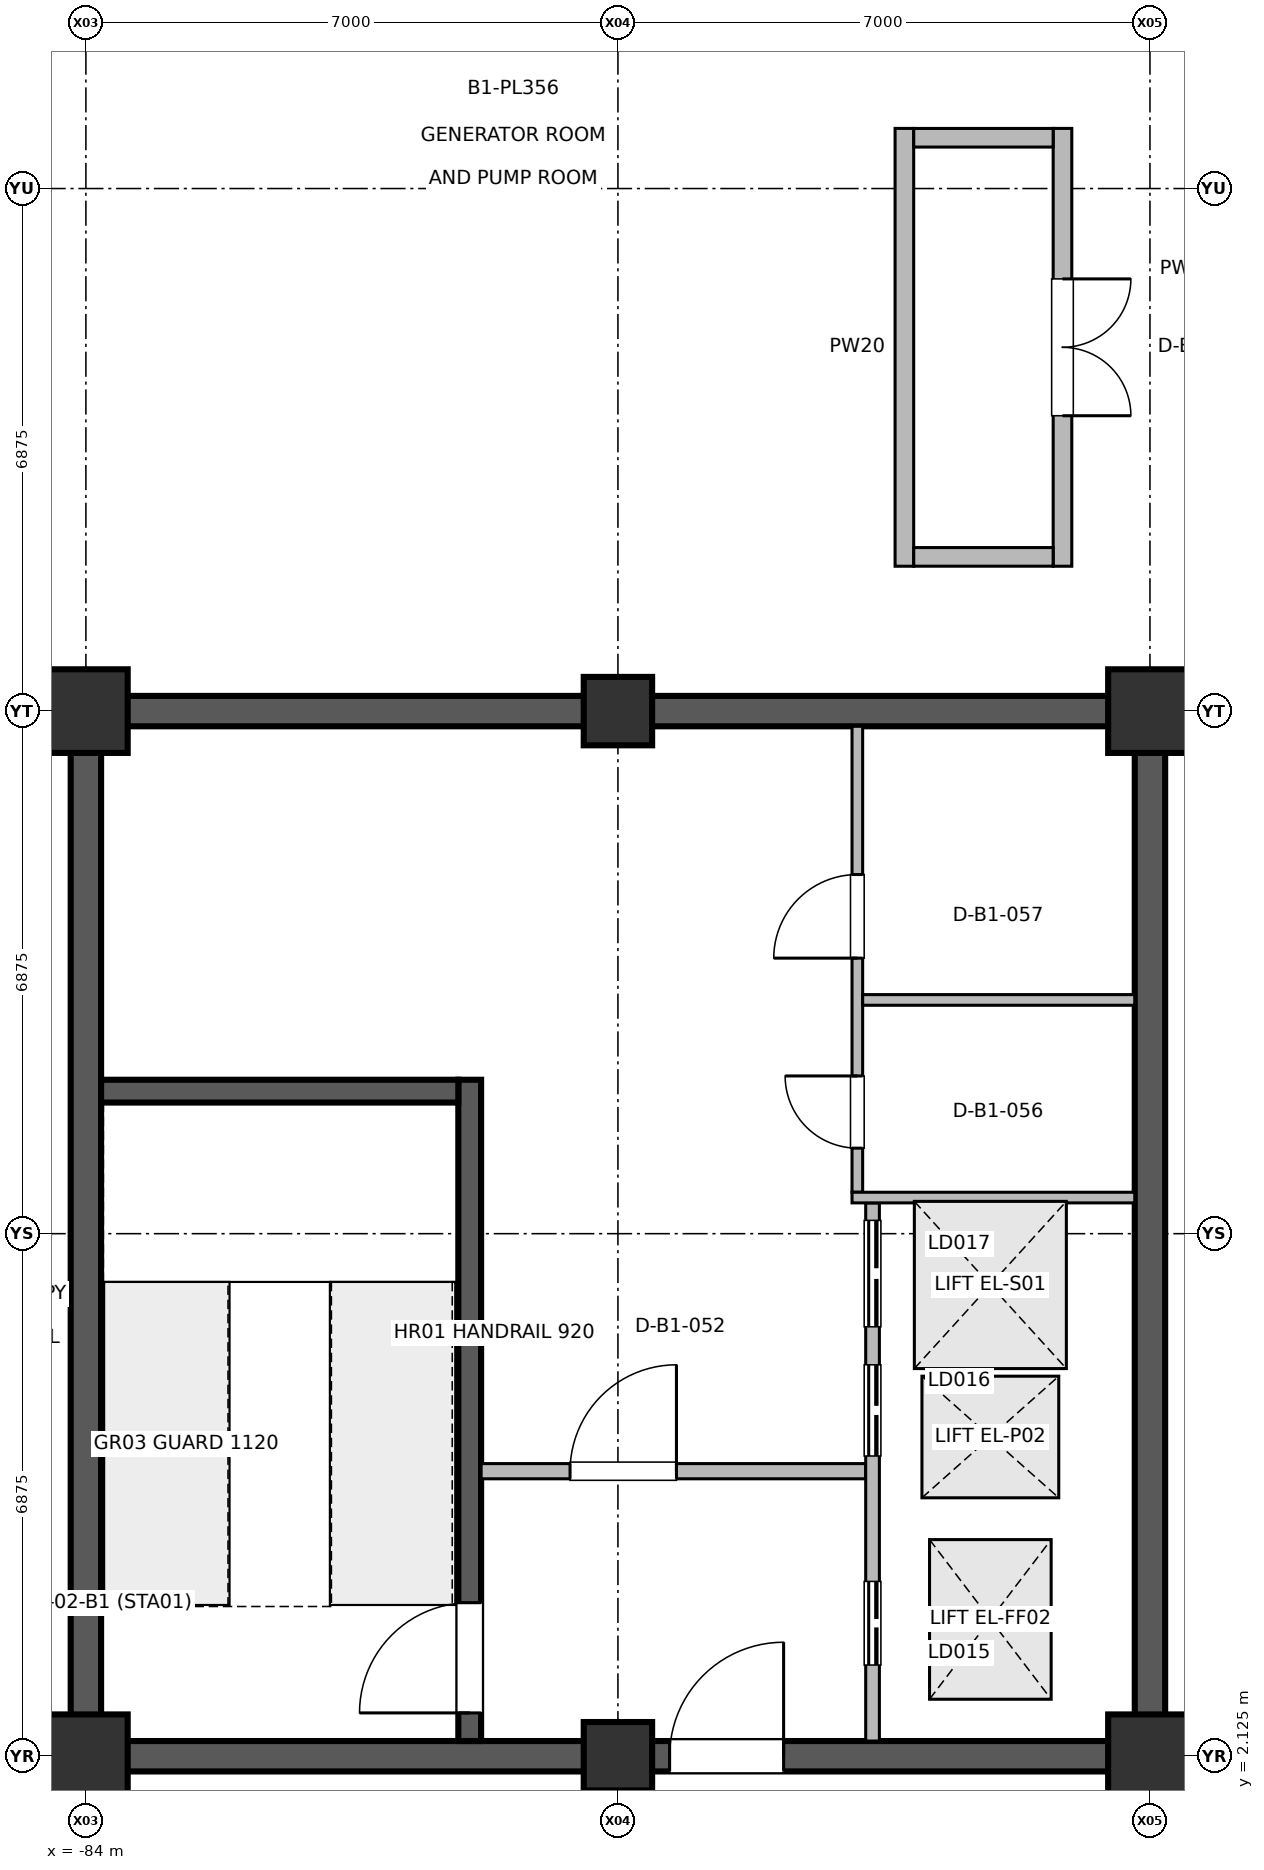
"""IFC4 building model, lengths in metres.
Left out: names, types, materials, properties, quantities, classifications, styles, units other than length and angle.
Written with IfcOpenShell. Run it as: python <this file> out.ifc"""

import sys

from ifc_helpers import new_model, si_unit, direction, frame, frame_2d, origin, origin_2d, place, context, subcontext, project, spatial, rectangle, extrude, element, fill, save


model = new_model("IFC4")
c1 = context("Model", 3, precision=1e-05, world=origin(), true_north=direction((0.0, 1.0)))
c2 = subcontext(c1, "Body", "Model", "MODEL_VIEW")
j1 = project(units=[si_unit("LENGTHUNIT", "METRE"), si_unit("PLANEANGLEUNIT", "RADIAN")], contexts=[c1])
p1 = place(None, origin())
s1 = spatial("IfcSite", under=j1, at=p1, CompositionType="ELEMENT")
p2 = place(p1, origin())
s2 = spatial("IfcBuilding", under=s1, at=p2, CompositionType="ELEMENT")
p3 = place(p2, frame((0.0, 0.0, -6.0)))
s3 = spatial("IfcBuildingStorey", under=s2, at=p3, CompositionType="ELEMENT", Elevation=-6.0)
for number, where, z_axis, x_axis in (
    (1, (-84.0, 2.125, 0.0), (0.0, 0.0, 1.0), (1.0, 0.0, 0.0)),
    (2, (-84.0, 15.875, 0.0), (0.0, 0.0, 1.0), (1.0, 0.0, 0.0)),
):
    element("IfcColumn", number, at=place(p3, frame(where, z_axis=z_axis, x_axis=x_axis)), inside=s3, PredefinedType="COLUMN", context=c2, shape_type="SweptSolid", body=[
        extrude(rectangle(XDim=1.1, YDim=1.1, at=origin_2d()), origin(), (0.0, 0.0, 1.0), 5.998),
    ])
for number, where, z_axis, x_axis in (
    (3, (-77.0, 2.125, 0.0), (0.0, 0.0, 1.0), (1.0, 0.0, 0.0)),
    (4, (-77.0, 15.875, 0.0), (0.0, 0.0, 1.0), (1.0, 0.0, 0.0)),
):
    element("IfcColumn", number, at=place(p3, frame(where, z_axis=z_axis, x_axis=x_axis)), inside=s3, PredefinedType="COLUMN", context=c2, shape_type="SweptSolid", body=[
        extrude(rectangle(XDim=0.9, YDim=0.9, at=origin_2d()), origin(), (0.0, 0.0, 1.0), 5.998),
    ])
for number, where, z_axis, x_axis in (
    (5, (-70.0, 2.125, 0.0), (0.0, 0.0, 1.0), (1.0, 0.0, 0.0)),
    (6, (-70.0, 15.875, 0.0), (0.0, 0.0, 1.0), (1.0, 0.0, 0.0)),
):
    element("IfcColumn", number, at=place(p3, frame(where, z_axis=z_axis, x_axis=x_axis)), inside=s3, PredefinedType="COLUMN", context=c2, shape_type="SweptSolid", body=[
        extrude(rectangle(XDim=1.1, YDim=1.1, at=origin_2d()), origin(), (0.0, 0.0, 1.0), 5.998),
    ])
for number, where, z_axis, x_axis in (
    (7, (-84.0, 2.325, 0.0), (0.0, 0.0, 1.0), (0.0, 1.0, 0.0)),
    (8, (-70.0, 2.325, 0.0), (0.0, 0.0, 1.0), (0.0, 1.0, 0.0)),
):
    element("IfcWall", number, at=place(p3, frame(where, z_axis=z_axis, x_axis=x_axis)), inside=s3, PredefinedType="SHEAR", context=c2, shape_type="SweptSolid", body=[
        extrude(rectangle(XDim=13.35, YDim=0.4, at=frame_2d((6.675, 0.0))), origin(), (0.0, 0.0, 1.0), 5.75),
    ])
p4 = place(p3, frame((-83.8, 2.125, 0.0), z_axis=(0.0, 0.0, 1.0), x_axis=(1.0, 0.0, 0.0)))
e9 = element("IfcWall", 9, at=p4, inside=s3, PredefinedType="SHEAR", context=c2, shape_type="SweptSolid", body=[
    extrude(rectangle(XDim=13.6, YDim=0.4, at=frame_2d((6.8, 0.0))), origin(), (0.0, 0.0, 1.0), 5.75),
])
p5 = place(p4, frame((7.48, 0.0, 0.0)))
e10 = element("IfcOpeningElement", 10, at=p5, cuts=e9, PredefinedType="OPENING", context=c2, shape_type="SweptSolid", body=[
    extrude(rectangle(XDim=1.5, YDim=2.2, at=frame_2d((0.75, 1.1))), frame((0.0, 0.21, 0.0), z_axis=(0.0, -1.0, 0.0), x_axis=(1.0, 0.0, 0.0)), (0.0, 0.0, 1.0), 0.42),
])
p6 = place(p3, frame((-83.8, 15.875, 0.0), z_axis=(0.0, 0.0, 1.0), x_axis=(1.0, 0.0, 0.0)))
e11 = element("IfcWall", 11, at=p6, inside=s3, PredefinedType="SHEAR", context=c2, shape_type="SweptSolid", body=[
    extrude(rectangle(XDim=13.6, YDim=0.4, at=frame_2d((6.8, 0.0))), origin(), (0.0, 0.0, 1.0), 5.75),
])
p7 = place(p3, frame((-78.95, 2.325, 0.0), z_axis=(0.0, 0.0, 1.0), x_axis=(0.0, 1.0, 0.0)))
e12 = element("IfcWall", 12, at=p7, inside=s3, PredefinedType="SHEAR", context=c2, shape_type="SweptSolid", body=[
    extrude(rectangle(XDim=8.7, YDim=0.3, at=frame_2d((4.35, 0.0))), origin(), (0.0, 0.0, 1.0), 5.75),
])
p8 = place(p7, frame((0.37, 0.0, 0.0)))
e13 = element("IfcOpeningElement", 13, at=p8, cuts=e12, PredefinedType="OPENING", context=c2, shape_type="SweptSolid", body=[
    extrude(rectangle(XDim=1.45, YDim=2.2, at=frame_2d((0.725, 1.1))), frame((0.0, 0.16, 0.0), z_axis=(0.0, -1.0, 0.0), x_axis=(1.0, 0.0, 0.0)), (0.0, 0.0, 1.0), 0.32),
])
p9 = place(p3, frame((-78.8, 5.875, 0.0), z_axis=(0.0, 0.0, 1.0), x_axis=(1.0, 0.0, 0.0)))
e14 = element("IfcWall", 14, at=p9, inside=s3, PredefinedType="PARTITIONING", context=c2, shape_type="SweptSolid", body=[
    extrude(rectangle(XDim=5.06, YDim=0.2, at=frame_2d((2.53, 0.0))), origin(), (0.0, 0.0, 1.0), 5.02),
])
p10 = place(p9, frame((1.17, 0.0, 0.0)))
e15 = element("IfcOpeningElement", 15, at=p10, cuts=e14, PredefinedType="OPENING", context=c2, shape_type="SweptSolid", body=[
    extrude(rectangle(XDim=1.4, YDim=2.2, at=frame_2d((0.7, 1.1))), frame((0.0, 0.11, 0.0), z_axis=(0.0, -1.0, 0.0), x_axis=(1.0, 0.0, 0.0)), (0.0, 0.0, 1.0), 0.22),
])
p11 = place(p3, frame((-73.65, 2.325, 0.0), z_axis=(0.0, 0.0, 1.0), x_axis=(0.0, 1.0, 0.0)))
e16 = element("IfcWall", 16, at=p11, inside=s3, PredefinedType="PARTITIONING", context=c2, shape_type="SweptSolid", body=[
    extrude(rectangle(XDim=7.08, YDim=0.18, at=frame_2d((3.54, 0.0))), origin(), (0.0, 0.0, 1.0), 5.02),
])
p12 = place(p11, frame((1.0, 0.0, 0.0)))
e17 = element("IfcOpeningElement", 17, at=p12, cuts=e16, PredefinedType="OPENING", context=c2, shape_type="SweptSolid", body=[
    extrude(rectangle(XDim=1.1, YDim=2.2, at=frame_2d((0.55, 1.1))), frame((0.0, 0.1, 0.0), z_axis=(0.0, -1.0, 0.0), x_axis=(1.0, 0.0, 0.0)), (0.0, 0.0, 1.0), 0.2),
])
p13 = place(p11, frame((3.75, 0.0, 0.0)))
e18 = element("IfcOpeningElement", 18, at=p13, cuts=e16, PredefinedType="OPENING", context=c2, shape_type="SweptSolid", body=[
    extrude(rectangle(XDim=1.2, YDim=2.25, at=frame_2d((0.6, 1.125))), frame((0.0, 0.1, 0.0), z_axis=(0.0, -1.0, 0.0), x_axis=(1.0, 0.0, 0.0)), (0.0, 0.0, 1.0), 0.2),
])
p14 = place(p11, frame((5.45, 0.0, 0.0)))
e19 = element("IfcOpeningElement", 19, at=p14, cuts=e16, PredefinedType="OPENING", context=c2, shape_type="SweptSolid", body=[
    extrude(rectangle(XDim=1.4, YDim=2.3, at=frame_2d((0.7, 1.15))), frame((0.0, 0.1, 0.0), z_axis=(0.0, -1.0, 0.0), x_axis=(1.0, 0.0, 0.0)), (0.0, 0.0, 1.0), 0.2),
])
p15 = place(p3, frame((-73.85, 9.545, 0.0), z_axis=(0.0, 0.0, 1.0), x_axis=(0.0, 1.0, 0.0)))
e20 = element("IfcWall", 20, at=p15, inside=s3, PredefinedType="PARTITIONING", context=c2, shape_type="SweptSolid", body=[
    extrude(rectangle(XDim=6.13, YDim=0.14, at=frame_2d((3.065, 0.0))), origin(), (0.0, 0.0, 1.0), 5.02),
])
p16 = place(p15, frame((0.58, 0.0, 0.0)))
e21 = element("IfcOpeningElement", 21, at=p16, cuts=e20, PredefinedType="OPENING", context=c2, shape_type="SweptSolid", body=[
    extrude(rectangle(XDim=0.95, YDim=2.15, at=frame_2d((0.475, 1.075))), frame((0.0, 0.08, 0.0), z_axis=(0.0, -1.0, 0.0), x_axis=(1.0, 0.0, 0.0)), (0.0, 0.0, 1.0), 0.16),
])
p17 = place(p15, frame((3.08, 0.0, 0.0)))
e22 = element("IfcOpeningElement", 22, at=p17, cuts=e20, PredefinedType="OPENING", context=c2, shape_type="SweptSolid", body=[
    extrude(rectangle(XDim=1.1, YDim=2.15, at=frame_2d((0.55, 1.075))), frame((0.0, 0.08, 0.0), z_axis=(0.0, -1.0, 0.0), x_axis=(1.0, 0.0, 0.0)), (0.0, 0.0, 1.0), 0.16),
])
p18 = place(p3, frame((-71.151, 23.541, 0.0), z_axis=(0.0, 0.0, 1.0), x_axis=(0.0, -1.0, 0.0)))
e23 = element("IfcWall", 23, at=p18, inside=s3, PredefinedType="PARTITIONING", context=c2, shape_type="SweptSolid", body=[
    extrude(rectangle(XDim=5.76, YDim=0.245, at=frame_2d((2.88, 0.0))), origin(), (0.0, 0.0, 1.0), 5.02),
])
p19 = place(p18, frame((1.98, 0.0, 0.0)))
e24 = element("IfcOpeningElement", 24, at=p19, cuts=e23, PredefinedType="OPENING", context=c2, shape_type="SweptSolid", body=[
    extrude(rectangle(XDim=1.8, YDim=2.3, at=frame_2d((0.9, 1.15))), frame((0.0, 0.133, 0.0), z_axis=(0.0, -1.0, 0.0), x_axis=(1.0, 0.0, 0.0)), (0.0, 0.0, 1.0), 0.265),
])
p20 = place(p3, frame((-73.92, 9.475, 0.0), z_axis=(0.0, 0.0, 1.0), x_axis=(1.0, 0.0, 0.0)))
e25 = element("IfcWall", 25, at=p20, inside=s3, PredefinedType="PARTITIONING", context=c2, shape_type="SweptSolid", body=[
    extrude(rectangle(XDim=3.72, YDim=0.14, at=frame_2d((1.86, 0.0))), origin(), (0.0, 0.0, 1.0), 5.02),
])
p21 = place(p3, frame((-73.78, 12.075, 0.0), z_axis=(0.0, 0.0, 1.0), x_axis=(1.0, 0.0, 0.0)))
e26 = element("IfcWall", 26, at=p21, inside=s3, PredefinedType="PARTITIONING", context=c2, shape_type="SweptSolid", body=[
    extrude(rectangle(XDim=3.58, YDim=0.14, at=frame_2d((1.79, 0.0))), origin(), (0.0, 0.0, 1.0), 5.02),
])
p22 = place(p3, frame((-73.231, 17.781, 0.0), z_axis=(0.0, 0.0, 1.0), x_axis=(0.0, 1.0, 0.0)))
e27 = element("IfcWall", 27, at=p22, inside=s3, PredefinedType="PARTITIONING", context=c2, shape_type="SweptSolid", body=[
    extrude(rectangle(XDim=5.76, YDim=0.245, at=frame_2d((2.88, 0.0))), origin(), (0.0, 0.0, 1.0), 5.02),
])
for number, where, z_axis, x_axis in (
    (28, (-73.108, 17.904, 0.0), (0.0, 0.0, 1.0), (1.0, 0.0, 0.0)),
    (29, (-73.108, 23.418, 0.0), (0.0, 0.0, 1.0), (1.0, 0.0, 0.0)),
):
    element("IfcWall", number, at=place(p3, frame(where, z_axis=z_axis, x_axis=x_axis)), inside=s3, PredefinedType="PARTITIONING", context=c2, shape_type="SweptSolid", body=[
        extrude(rectangle(XDim=1.834, YDim=0.245, at=frame_2d((0.917, 0.0))), origin(), (0.0, 0.0, 1.0), 5.02),
    ])
p23 = place(p3, frame((-83.8, 10.875, 0.0), z_axis=(0.0, 0.0, 1.0), x_axis=(1.0, 0.0, 0.0)))
e30 = element("IfcWall", 30, at=p23, inside=s3, PredefinedType="SHEAR", context=c2, shape_type="SweptSolid", body=[
    extrude(rectangle(XDim=4.7, YDim=0.3, at=frame_2d((2.35, 0.0))), origin(), (0.0, 0.0, 1.0), 5.75),
])
p24 = place(p5, origin())
e31 = element("IfcDoor", 31, at=p24, inside=s3, OperationType="SINGLE_SWING_RIGHT", PredefinedType="DOOR", context=c2, shape_type="SweptSolid", body=[
    extrude(rectangle(XDim=1.5, YDim=2.2, at=frame_2d((0.75, 1.1))), frame((0.0, 0.025, 0.0), z_axis=(0.0, -1.0, 0.0), x_axis=(1.0, 0.0, 0.0)), (0.0, 0.0, 1.0), 0.05),
])
fill(e10, e31)
p25 = place(p8, origin())
e32 = element("IfcDoor", 32, at=p25, inside=s3, OperationType="SINGLE_SWING_LEFT", PredefinedType="DOOR", context=c2, shape_type="SweptSolid", body=[
    extrude(rectangle(XDim=1.45, YDim=2.2, at=frame_2d((0.725, 1.1))), frame((0.0, 0.025, 0.0), z_axis=(0.0, -1.0, 0.0), x_axis=(1.0, 0.0, 0.0)), (0.0, 0.0, 1.0), 0.05),
])
fill(e13, e32)
p26 = place(p10, origin())
e33 = element("IfcDoor", 33, at=p26, inside=s3, OperationType="SINGLE_SWING_RIGHT", PredefinedType="DOOR", context=c2, shape_type="SweptSolid", body=[
    extrude(rectangle(XDim=1.4, YDim=2.2, at=frame_2d((0.7, 1.1))), frame((0.0, 0.025, 0.0), z_axis=(0.0, -1.0, 0.0), x_axis=(1.0, 0.0, 0.0)), (0.0, 0.0, 1.0), 0.05),
])
fill(e15, e33)
p27 = place(p12, origin())
e34 = element("IfcDoor", 34, at=p27, inside=s3, OperationType="DOUBLE_DOOR_SLIDING", PredefinedType="DOOR", context=c2, shape_type="SweptSolid", body=[
    extrude(rectangle(XDim=1.1, YDim=2.2, at=frame_2d((0.55, 1.1))), frame((0.0, 0.025, 0.0), z_axis=(0.0, -1.0, 0.0), x_axis=(1.0, 0.0, 0.0)), (0.0, 0.0, 1.0), 0.05),
])
fill(e17, e34)
p28 = place(p13, origin())
e35 = element("IfcDoor", 35, at=p28, inside=s3, OperationType="DOUBLE_DOOR_SLIDING", PredefinedType="DOOR", context=c2, shape_type="SweptSolid", body=[
    extrude(rectangle(XDim=1.2, YDim=2.25, at=frame_2d((0.6, 1.125))), frame((0.0, 0.025, 0.0), z_axis=(0.0, -1.0, 0.0), x_axis=(1.0, 0.0, 0.0)), (0.0, 0.0, 1.0), 0.05),
])
fill(e18, e35)
p29 = place(p14, origin())
e36 = element("IfcDoor", 36, at=p29, inside=s3, OperationType="DOUBLE_DOOR_SLIDING", PredefinedType="DOOR", context=c2, shape_type="SweptSolid", body=[
    extrude(rectangle(XDim=1.4, YDim=2.3, at=frame_2d((0.7, 1.15))), frame((0.0, 0.025, 0.0), z_axis=(0.0, -1.0, 0.0), x_axis=(1.0, 0.0, 0.0)), (0.0, 0.0, 1.0), 0.05),
])
fill(e19, e36)
p30 = place(p16, origin())
e37 = element("IfcDoor", 37, at=p30, inside=s3, OperationType="SINGLE_SWING_RIGHT", PredefinedType="DOOR", context=c2, shape_type="SweptSolid", body=[
    extrude(rectangle(XDim=0.95, YDim=2.15, at=frame_2d((0.475, 1.075))), frame((0.0, 0.025, 0.0), z_axis=(0.0, -1.0, 0.0), x_axis=(1.0, 0.0, 0.0)), (0.0, 0.0, 1.0), 0.05),
])
fill(e21, e37)
p31 = place(p17, origin())
e38 = element("IfcDoor", 38, at=p31, inside=s3, OperationType="SINGLE_SWING_LEFT", PredefinedType="DOOR", context=c2, shape_type="SweptSolid", body=[
    extrude(rectangle(XDim=1.1, YDim=2.15, at=frame_2d((0.55, 1.075))), frame((0.0, 0.025, 0.0), z_axis=(0.0, -1.0, 0.0), x_axis=(1.0, 0.0, 0.0)), (0.0, 0.0, 1.0), 0.05),
])
fill(e22, e38)
p32 = place(p19, origin())
e39 = element("IfcDoor", 39, at=p32, inside=s3, OperationType="DOUBLE_DOOR_SINGLE_SWING", PredefinedType="DOOR", context=c2, shape_type="SweptSolid", body=[
    extrude(rectangle(XDim=1.8, YDim=2.3, at=frame_2d((0.9, 1.15))), frame((0.0, 0.025, 0.0), z_axis=(0.0, -1.0, 0.0), x_axis=(1.0, 0.0, 0.0)), (0.0, 0.0, 1.0), 0.05),
])
fill(e24, e39)
save(model, sys.argv[1])
